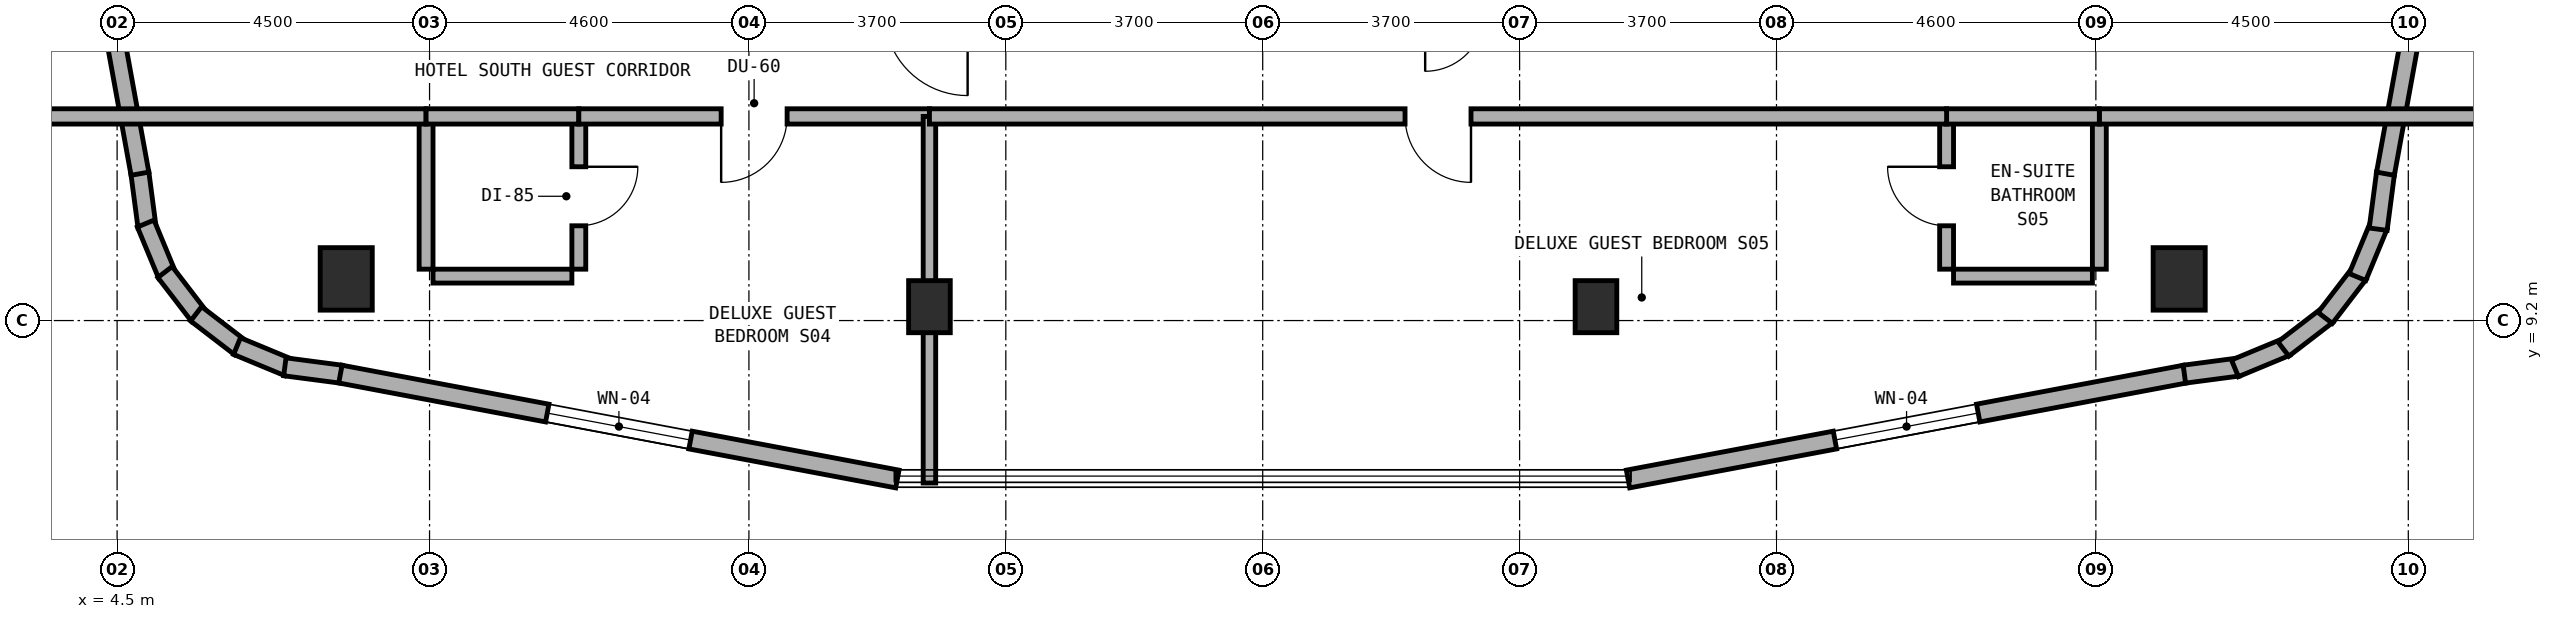
"""IFC4 building model, lengths in metres.
Left out: names, types, materials, properties, quantities, classifications, styles, units other than length and angle.
Written with IfcOpenShell. Run it as: python <this file> out.ifc"""

import sys

from ifc_helpers import new_model, si_unit, direction, frame, frame_2d, origin, origin_2d, place, context, subcontext, project, spatial, rectangle, extrude, element, fill, save


model = new_model("IFC4")
c1 = context("Model", 3, precision=1e-05, world=origin(), true_north=direction((0.0, 1.0)))
c2 = subcontext(c1, "Body", "Model", "MODEL_VIEW")
j1 = project(units=[si_unit("LENGTHUNIT", "METRE"), si_unit("PLANEANGLEUNIT", "RADIAN")], contexts=[c1])
p1 = place(None, origin())
s1 = spatial("IfcSite", under=j1, at=p1, CompositionType="ELEMENT")
p2 = place(p1, origin())
s2 = spatial("IfcBuilding", under=s1, at=p2, CompositionType="ELEMENT")
p3 = place(p2, frame((0.0, 0.0, 250.4)))
s3 = spatial("IfcBuildingStorey", under=s2, at=p3, CompositionType="ELEMENT", Elevation=250.4)
for number, where, z_axis, x_axis in (
    (1, (16.2, 9.4, 0.0), (0.0, 0.0, 1.0), (1.0, 0.0, 0.0)),
    (2, (25.8, 9.4, 0.0), (0.0, 0.0, 1.0), (1.0, 0.0, 0.0)),
):
    element("IfcColumn", number, at=place(p3, frame(where, z_axis=z_axis, x_axis=x_axis)), inside=s3, PredefinedType="COLUMN", context=c2, shape_type="SweptSolid", body=[
        extrude(rectangle(XDim=0.6, YDim=0.75, at=origin_2d()), origin(), (0.0, 0.0, 1.0), 3.6),
    ])
for number, where, z_axis, x_axis in (
    (3, (7.8, 9.8, 0.0), (0.0, 0.0, 1.0), (1.0, 0.0, 0.0)),
    (4, (34.2, 9.8, 0.0), (0.0, 0.0, 1.0), (1.0, 0.0, 0.0)),
):
    element("IfcColumn", number, at=place(p3, frame(where, z_axis=z_axis, x_axis=x_axis)), inside=s3, PredefinedType="COLUMN", context=c2, shape_type="SweptSolid", body=[
        extrude(rectangle(XDim=0.75, YDim=0.9, at=origin_2d()), origin(), (0.0, 0.0, 1.0), 3.6),
    ])
p4 = place(p3, frame((4.828, 11.325, 0.0), z_axis=(0.0, 0.0, 1.0), x_axis=(0.130729574419, -0.991418064377, 0.0)))
e5 = element("IfcWall", 5, at=p4, inside=s3, PredefinedType="STANDARD", context=c2, shape_type="SweptSolid", body=[
    extrude(rectangle(XDim=0.781, YDim=0.26, at=frame_2d((0.39, 0.0))), origin(), (0.0, 0.0, 1.0), 3.32),
])
p5 = place(p3, frame((4.912, 10.597, 0.0), z_axis=(0.0, 0.0, 1.0), x_axis=(0.382900540965, -0.923789573295, 0.0)))
e6 = element("IfcWall", 6, at=p5, inside=s3, PredefinedType="STANDARD", context=c2, shape_type="SweptSolid", body=[
    extrude(rectangle(XDim=0.799, YDim=0.26, at=frame_2d((0.399, 0.0))), origin(), (0.0, 0.0, 1.0), 3.32),
])
p6 = place(p3, frame((5.19, 9.899, 0.0), z_axis=(0.0, 0.0, 1.0), x_axis=(0.60916352983, -0.793044635519, 0.0)))
e7 = element("IfcWall", 7, at=p6, inside=s3, PredefinedType="STANDARD", context=c2, shape_type="SweptSolid", body=[
    extrude(rectangle(XDim=0.798, YDim=0.26, at=frame_2d((0.399, 0.0))), origin(), (0.0, 0.0, 1.0), 3.32),
])
p7 = place(p3, frame((5.638, 9.297, 0.0), z_axis=(0.0, 0.0, 1.0), x_axis=(0.793158129381, -0.609015748398, 0.0)))
e8 = element("IfcWall", 8, at=p7, inside=s3, PredefinedType="STANDARD", context=c2, shape_type="SweptSolid", body=[
    extrude(rectangle(XDim=0.798, YDim=0.26, at=frame_2d((0.399, 0.0))), origin(), (0.0, 0.0, 1.0), 3.32),
])
p8 = place(p3, frame((6.227, 8.832, 0.0), z_axis=(0.0, 0.0, 1.0), x_axis=(0.923681457047, -0.383161279238, 0.0)))
e9 = element("IfcWall", 9, at=p8, inside=s3, PredefinedType="STANDARD", context=c2, shape_type="SweptSolid", body=[
    extrude(rectangle(XDim=0.799, YDim=0.26, at=frame_2d((0.399, 0.0))), origin(), (0.0, 0.0, 1.0), 3.32),
])
p9 = place(p3, frame((6.916, 8.534, 0.0), z_axis=(0.0, 0.0, 1.0), x_axis=(0.99153354416, -0.129850802102, 0.0)))
e10 = element("IfcWall", 10, at=p9, inside=s3, PredefinedType="STANDARD", context=c2, shape_type="SweptSolid", body=[
    extrude(rectangle(XDim=0.816, YDim=0.26, at=frame_2d((0.408, 0.0))), origin(), (0.0, 0.0, 1.0), 3.32),
])
p10 = place(p3, frame((7.716, 8.429, 0.0), z_axis=(0.0, 0.0, 1.0), x_axis=(0.982719489139, -0.185101068789, 0.0)))
e11 = element("IfcWall", 11, at=p10, inside=s3, PredefinedType="STANDARD", context=c2, shape_type="SweptSolid", body=[
    extrude(rectangle(XDim=8.163, YDim=0.26, at=frame_2d((4.082, 0.0))), origin(), (0.0, 0.0, 1.0), 3.32),
])
p11 = place(p10, frame((3.032, 0.0, 0.85)))
e12 = element("IfcOpeningElement", 12, at=p11, cuts=e11, PredefinedType="OPENING", context=c2, shape_type="SweptSolid", body=[
    extrude(rectangle(XDim=2.1, YDim=1.5, at=frame_2d((1.05, 0.75))), frame((0.0, 0.14, 0.0), z_axis=(0.0, -1.0, 0.0), x_axis=(1.0, 0.0, 0.0)), (0.0, 0.0, 1.0), 0.28),
])
p12 = place(p3, frame((26.262, 6.918, 0.0), z_axis=(0.0, 0.0, 1.0), x_axis=(0.982719489139, 0.185101068789, 0.0)))
e13 = element("IfcWall", 13, at=p12, inside=s3, PredefinedType="STANDARD", context=c2, shape_type="SweptSolid", body=[
    extrude(rectangle(XDim=8.163, YDim=0.26, at=frame_2d((4.082, 0.0))), origin(), (0.0, 0.0, 1.0), 3.32),
])
p13 = place(p12, frame((3.032, 0.0, 0.85)))
e14 = element("IfcOpeningElement", 14, at=p13, cuts=e13, PredefinedType="OPENING", context=c2, shape_type="SweptSolid", body=[
    extrude(rectangle(XDim=2.1, YDim=1.5, at=frame_2d((1.05, 0.75))), frame((0.0, 0.14, 0.0), z_axis=(0.0, -1.0, 0.0), x_axis=(1.0, 0.0, 0.0)), (0.0, 0.0, 1.0), 0.28),
])
p14 = place(p3, frame((34.275, 8.428, 0.0), z_axis=(0.0, 0.0, 1.0), x_axis=(0.991423406861, 0.130689052056, 0.0)))
e15 = element("IfcWall", 15, at=p14, inside=s3, PredefinedType="STANDARD", context=c2, shape_type="SweptSolid", body=[
    extrude(rectangle(XDim=0.781, YDim=0.26, at=frame_2d((0.39, 0.0))), origin(), (0.0, 0.0, 1.0), 3.32),
])
p15 = place(p3, frame((35.003, 8.512, 0.0), z_axis=(0.0, 0.0, 1.0), x_axis=(0.923681457047, 0.383161279238, 0.0)))
e16 = element("IfcWall", 16, at=p15, inside=s3, PredefinedType="STANDARD", context=c2, shape_type="SweptSolid", body=[
    extrude(rectangle(XDim=0.799, YDim=0.26, at=frame_2d((0.399, 0.0))), origin(), (0.0, 0.0, 1.0), 3.32),
])
for number, where, z_axis, x_axis in (
    (17, (35.701, 8.79, 0.0), (0.0, 0.0, 1.0), (0.793, 0.609, 0.0)),
    (18, (36.303, 9.238, 0.0), (0.0, 0.0, 1.0), (0.609, 0.793, 0.0)),
):
    element("IfcWall", number, at=place(p3, frame(where, z_axis=z_axis, x_axis=x_axis)), inside=s3, PredefinedType="STANDARD", context=c2, shape_type="SweptSolid", body=[
        extrude(rectangle(XDim=0.798, YDim=0.26, at=frame_2d((0.399, 0.0))), origin(), (0.0, 0.0, 1.0), 3.32),
    ])
p16 = place(p3, frame((36.768, 9.827, 0.0), z_axis=(0.0, 0.0, 1.0), x_axis=(0.382900540965, 0.923789573295, 0.0)))
e19 = element("IfcWall", 19, at=p16, inside=s3, PredefinedType="STANDARD", context=c2, shape_type="SweptSolid", body=[
    extrude(rectangle(XDim=0.799, YDim=0.26, at=frame_2d((0.399, 0.0))), origin(), (0.0, 0.0, 1.0), 3.32),
])
p17 = place(p3, frame((37.066, 10.516, 0.0), z_axis=(0.0, 0.0, 1.0), x_axis=(0.130183552987, 0.991489910454, 0.0)))
e20 = element("IfcWall", 20, at=p17, inside=s3, PredefinedType="STANDARD", context=c2, shape_type="SweptSolid", body=[
    extrude(rectangle(XDim=0.816, YDim=0.26, at=frame_2d((0.408, 0.0))), origin(), (0.0, 0.0, 1.0), 3.32),
])
p18 = place(p3, frame((37.171, 11.315, 0.0), z_axis=(0.0, 0.0, 1.0), x_axis=(0.179061111398, 0.983837953316, 0.0)))
e21 = element("IfcWall", 21, at=p18, inside=s3, PredefinedType="STANDARD", context=c2, shape_type="SweptSolid", body=[
    extrude(rectangle(XDim=8.438, YDim=0.26, at=frame_2d((4.219, 0.0))), origin(), (0.0, 0.0, 1.0), 3.32),
])
p19 = place(p18, frame((4.308, 0.0, 0.85)))
e22 = element("IfcOpeningElement", 22, at=p19, cuts=e21, PredefinedType="OPENING", context=c2, shape_type="SweptSolid", body=[
    extrude(rectangle(XDim=2.1, YDim=1.5, at=frame_2d((1.05, 0.75))), frame((0.0, 0.14, 0.0), z_axis=(0.0, -1.0, 0.0), x_axis=(1.0, 0.0, 0.0)), (0.0, 0.0, 1.0), 0.28),
])
p20 = place(p3, frame((3.318, 19.617, 0.0), z_axis=(0.0, 0.0, 1.0), x_axis=(0.179061111398, -0.983837953316, 0.0)))
e23 = element("IfcWall", 23, at=p20, inside=s3, PredefinedType="STANDARD", context=c2, shape_type="SweptSolid", body=[
    extrude(rectangle(XDim=8.438, YDim=0.26, at=frame_2d((4.219, 0.0))), origin(), (0.0, 0.0, 1.0), 3.32),
])
p21 = place(p20, frame((2.691, 0.0, 0.85)))
e24 = element("IfcOpeningElement", 24, at=p21, cuts=e23, PredefinedType="OPENING", context=c2, shape_type="SweptSolid", body=[
    extrude(rectangle(XDim=2.1, YDim=1.5, at=frame_2d((1.05, 0.75))), frame((0.0, 0.14, 0.0), z_axis=(0.0, -1.0, 0.0), x_axis=(1.0, 0.0, 0.0)), (0.0, 0.0, 1.0), 0.28),
])
p22 = place(p3, frame((11.15, 9.94, 0.0), z_axis=(0.0, 0.0, 1.0), x_axis=(0.0, 1.0, 0.0)))
e25 = element("IfcWall", 25, at=p22, inside=s3, PredefinedType="PLUMBINGWALL", context=c2, shape_type="SweptSolid", body=[
    extrude(rectangle(XDim=2.1, YDim=0.2, at=frame_2d((1.05, 0.0))), origin(), (0.0, 0.0, 1.0), 3.055),
])
p23 = place(p22, frame((0.625, 0.0, 0.0)))
e26 = element("IfcOpeningElement", 26, at=p23, cuts=e25, PredefinedType="OPENING", context=c2, shape_type="SweptSolid", body=[
    extrude(rectangle(XDim=0.85, YDim=2.1, at=frame_2d((0.425, 1.05))), frame((0.0, 0.11, 0.0), z_axis=(0.0, -1.0, 0.0), x_axis=(1.0, 0.0, 0.0)), (0.0, 0.0, 1.0), 0.22),
])
p24 = place(p3, frame((9.05, 9.84, 0.0), z_axis=(0.0, 0.0, 1.0), x_axis=(1.0, 0.0, 0.0)))
e27 = element("IfcWall", 27, at=p24, inside=s3, PredefinedType="PLUMBINGWALL", context=c2, shape_type="SweptSolid", body=[
    extrude(rectangle(XDim=2.0, YDim=0.2, at=frame_2d((1.0, 0.0))), origin(), (0.0, 0.0, 1.0), 3.015),
])
p25 = place(p3, frame((8.95, 9.94, 0.0), z_axis=(0.0, 0.0, 1.0), x_axis=(0.0, 1.0, 0.0)))
e28 = element("IfcWall", 28, at=p25, inside=s3, PredefinedType="PLUMBINGWALL", context=c2, shape_type="SweptSolid", body=[
    extrude(rectangle(XDim=2.1, YDim=0.2, at=frame_2d((1.05, 0.0))), origin(), (0.0, 0.0, 1.0), 3.055),
])
p26 = place(p3, frame((3.36, 12.14, 0.0), z_axis=(0.0, 0.0, 1.0), x_axis=(1.0, 0.0, 0.0)))
e29 = element("IfcWall", 29, at=p26, inside=s3, PredefinedType="SOLIDWALL", context=c2, shape_type="SweptSolid", body=[
    extrude(rectangle(XDim=5.59, YDim=0.22, at=frame_2d((2.795, 0.0))), origin(), (0.0, 0.0, 1.0), 2.745),
])
p27 = place(p3, frame((8.95, 12.14, 0.0), z_axis=(0.0, 0.0, 1.0), x_axis=(1.0, 0.0, 0.0)))
e30 = element("IfcWall", 30, at=p27, inside=s3, PredefinedType="SOLIDWALL", context=c2, shape_type="SweptSolid", body=[
    extrude(rectangle(XDim=2.2, YDim=0.22, at=frame_2d((1.1, 0.0))), origin(), (0.0, 0.0, 1.0), 3.32),
])
p28 = place(p3, frame((11.15, 12.14, 0.0), z_axis=(0.0, 0.0, 1.0), x_axis=(1.0, 0.0, 0.0)))
e31 = element("IfcWall", 31, at=p28, inside=s3, PredefinedType="SOLIDWALL", context=c2, shape_type="SweptSolid", body=[
    extrude(rectangle(XDim=5.05, YDim=0.22, at=frame_2d((2.525, 0.0))), origin(), (0.0, 0.0, 1.0), 2.745),
])
p29 = place(p28, frame((2.05, 0.0, 0.0)))
e32 = element("IfcOpeningElement", 32, at=p29, cuts=e31, PredefinedType="OPENING", context=c2, shape_type="SweptSolid", body=[
    extrude(rectangle(XDim=0.95, YDim=2.1, at=frame_2d((0.475, 1.05))), frame((0.0, 0.12, 0.0), z_axis=(0.0, -1.0, 0.0), x_axis=(1.0, 0.0, 0.0)), (0.0, 0.0, 1.0), 0.24),
])
p30 = place(p3, frame((16.2, 6.86, 0.0), z_axis=(0.0, 0.0, 1.0), x_axis=(0.0, 1.0, 0.0)))
e33 = element("IfcWall", 33, at=p30, inside=s3, PredefinedType="SOLIDWALL", context=c2, shape_type="SweptSolid", body=[
    extrude(rectangle(XDim=5.28, YDim=0.18, at=frame_2d((2.64, 0.0))), origin(), (0.0, 0.0, 1.0), 2.745),
])
p31 = place(p3, frame((30.85, 9.94, 0.0), z_axis=(0.0, 0.0, 1.0), x_axis=(0.0, 1.0, 0.0)))
e34 = element("IfcWall", 34, at=p31, inside=s3, PredefinedType="PLUMBINGWALL", context=c2, shape_type="SweptSolid", body=[
    extrude(rectangle(XDim=2.1, YDim=0.2, at=frame_2d((1.05, 0.0))), origin(), (0.0, 0.0, 1.0), 3.055),
])
p32 = place(p31, frame((0.625, 0.0, 0.0)))
e35 = element("IfcOpeningElement", 35, at=p32, cuts=e34, PredefinedType="OPENING", context=c2, shape_type="SweptSolid", body=[
    extrude(rectangle(XDim=0.85, YDim=2.1, at=frame_2d((0.425, 1.05))), frame((0.0, 0.11, 0.0), z_axis=(0.0, -1.0, 0.0), x_axis=(1.0, 0.0, 0.0)), (0.0, 0.0, 1.0), 0.22),
])
p33 = place(p3, frame((30.95, 9.84, 0.0), z_axis=(0.0, 0.0, 1.0), x_axis=(1.0, 0.0, 0.0)))
e36 = element("IfcWall", 36, at=p33, inside=s3, PredefinedType="PLUMBINGWALL", context=c2, shape_type="SweptSolid", body=[
    extrude(rectangle(XDim=2.0, YDim=0.2, at=frame_2d((1.0, 0.0))), origin(), (0.0, 0.0, 1.0), 3.015),
])
p34 = place(p3, frame((33.05, 9.94, 0.0), z_axis=(0.0, 0.0, 1.0), x_axis=(0.0, 1.0, 0.0)))
e37 = element("IfcWall", 37, at=p34, inside=s3, PredefinedType="PLUMBINGWALL", context=c2, shape_type="SweptSolid", body=[
    extrude(rectangle(XDim=2.1, YDim=0.2, at=frame_2d((1.05, 0.0))), origin(), (0.0, 0.0, 1.0), 3.055),
])
p35 = place(p3, frame((33.05, 12.14, 0.0), z_axis=(0.0, 0.0, 1.0), x_axis=(1.0, 0.0, 0.0)))
e38 = element("IfcWall", 38, at=p35, inside=s3, PredefinedType="SOLIDWALL", context=c2, shape_type="SweptSolid", body=[
    extrude(rectangle(XDim=5.59, YDim=0.22, at=frame_2d((2.795, 0.0))), origin(), (0.0, 0.0, 1.0), 2.745),
])
p36 = place(p3, frame((30.85, 12.14, 0.0), z_axis=(0.0, 0.0, 1.0), x_axis=(1.0, 0.0, 0.0)))
e39 = element("IfcWall", 39, at=p36, inside=s3, PredefinedType="SOLIDWALL", context=c2, shape_type="SweptSolid", body=[
    extrude(rectangle(XDim=2.2, YDim=0.22, at=frame_2d((1.1, 0.0))), origin(), (0.0, 0.0, 1.0), 3.32),
])
p37 = place(p3, frame((16.2, 12.14, 0.0), z_axis=(0.0, 0.0, 1.0), x_axis=(1.0, 0.0, 0.0)))
e40 = element("IfcWall", 40, at=p37, inside=s3, PredefinedType="SOLIDWALL", context=c2, shape_type="SweptSolid", body=[
    extrude(rectangle(XDim=14.65, YDim=0.22, at=frame_2d((7.325, 0.0))), origin(), (0.0, 0.0, 1.0), 2.745),
])
p38 = place(p37, frame((6.85, 0.0, 0.0)))
e41 = element("IfcOpeningElement", 41, at=p38, cuts=e40, PredefinedType="OPENING", context=c2, shape_type="SweptSolid", body=[
    extrude(rectangle(XDim=0.95, YDim=2.1, at=frame_2d((0.475, 1.05))), frame((0.0, 0.12, 0.0), z_axis=(0.0, -1.0, 0.0), x_axis=(1.0, 0.0, 0.0)), (0.0, 0.0, 1.0), 0.24),
])
p39 = place(p11, origin())
e42 = element("IfcWindow", 42, at=p39, inside=s3, PartitioningType="SINGLE_PANEL", PredefinedType="WINDOW", context=c2, shape_type="SweptSolid", body=[
    extrude(rectangle(XDim=2.1, YDim=1.5, at=frame_2d((1.05, 0.75))), frame((0.0, 0.03, 0.0), z_axis=(0.0, -1.0, 0.0), x_axis=(1.0, 0.0, 0.0)), (0.0, 0.0, 1.0), 0.06),
])
fill(e12, e42)
p40 = place(p13, origin())
e43 = element("IfcWindow", 43, at=p40, inside=s3, PartitioningType="SINGLE_PANEL", PredefinedType="WINDOW", context=c2, shape_type="SweptSolid", body=[
    extrude(rectangle(XDim=2.1, YDim=1.5, at=frame_2d((1.05, 0.75))), frame((0.0, 0.03, 0.0), z_axis=(0.0, -1.0, 0.0), x_axis=(1.0, 0.0, 0.0)), (0.0, 0.0, 1.0), 0.06),
])
fill(e14, e43)
p41 = place(p23, frame((0.85, 0.0, 0.0), z_axis=(0.0, 0.0, 1.0), x_axis=(-1.0, 0.0, 0.0)))
e44 = element("IfcDoor", 44, at=p41, inside=s3, OperationType="SINGLE_SWING_LEFT", PredefinedType="DOOR", context=c2, shape_type="SweptSolid", body=[
    extrude(rectangle(XDim=0.85, YDim=2.1, at=frame_2d((0.425, 1.05))), frame((0.0, 0.025, 0.0), z_axis=(0.0, -1.0, 0.0), x_axis=(1.0, 0.0, 0.0)), (0.0, 0.0, 1.0), 0.05),
])
fill(e26, e44)
p42 = place(p29, frame((0.95, 0.0, 0.0), z_axis=(0.0, 0.0, 1.0), x_axis=(-1.0, 0.0, 0.0)))
e45 = element("IfcDoor", 45, at=p42, inside=s3, OperationType="SINGLE_SWING_RIGHT", PredefinedType="DOOR", context=c2, shape_type="SweptSolid", body=[
    extrude(rectangle(XDim=0.95, YDim=2.1, at=frame_2d((0.475, 1.05))), frame((0.0, 0.025, 0.0), z_axis=(0.0, -1.0, 0.0), x_axis=(1.0, 0.0, 0.0)), (0.0, 0.0, 1.0), 0.05),
])
fill(e32, e45)
p43 = place(p32, origin())
e46 = element("IfcDoor", 46, at=p43, inside=s3, OperationType="SINGLE_SWING_RIGHT", PredefinedType="DOOR", context=c2, shape_type="SweptSolid", body=[
    extrude(rectangle(XDim=0.85, YDim=2.1, at=frame_2d((0.425, 1.05))), frame((0.0, 0.025, 0.0), z_axis=(0.0, -1.0, 0.0), x_axis=(1.0, 0.0, 0.0)), (0.0, 0.0, 1.0), 0.05),
])
fill(e35, e46)
p44 = place(p38, frame((0.95, 0.0, 0.0), z_axis=(0.0, 0.0, 1.0), x_axis=(-1.0, 0.0, 0.0)))
e47 = element("IfcDoor", 47, at=p44, inside=s3, OperationType="SINGLE_SWING_LEFT", PredefinedType="DOOR", context=c2, shape_type="SweptSolid", body=[
    extrude(rectangle(XDim=0.95, YDim=2.1, at=frame_2d((0.475, 1.05))), frame((0.0, 0.025, 0.0), z_axis=(0.0, -1.0, 0.0), x_axis=(1.0, 0.0, 0.0)), (0.0, 0.0, 1.0), 0.05),
])
fill(e41, e47)
save(model, sys.argv[1])
